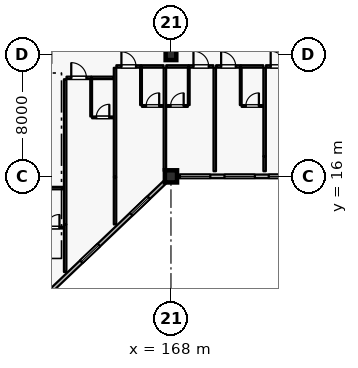
"""IFC4 building model, lengths in metres.
Left out: names, types, materials, properties, quantities, classifications, styles, units other than length and angle.
Written with IfcOpenShell. Run it as: python <this file> out.ifc"""

import sys

from ifc_helpers import new_model, si_unit, direction, frame, frame_2d, origin, origin_2d, place, context, subcontext, project, spatial, rectangle, extrude, element, fill, save


model = new_model("IFC4")
c1 = context("Model", 3, precision=1e-05, world=origin(), true_north=direction((0.0, 1.0)))
c2 = subcontext(c1, "Body", "Model", "MODEL_VIEW")
j1 = project(units=[si_unit("LENGTHUNIT", "METRE"), si_unit("PLANEANGLEUNIT", "RADIAN")], contexts=[c1])
p1 = place(None, origin())
s1 = spatial("IfcSite", under=j1, at=p1, CompositionType="ELEMENT")
p2 = place(p1, origin())
s2 = spatial("IfcBuilding", under=s1, at=p2, CompositionType="ELEMENT")
p3 = place(p2, frame((0.0, 0.0, 16.2)))
s3 = spatial("IfcBuildingStorey", under=s2, at=p3, CompositionType="ELEMENT", Elevation=16.2)
p4 = place(p3, frame((168.0, 16.0, 0.0), z_axis=(0.0, 0.0, 1.0), x_axis=(1.0, 0.0, 0.0)))
e1 = element("IfcColumn", 1, at=p4, inside=s3, PredefinedType="COLUMN", context=c2, shape_type="SweptSolid", body=[
    extrude(rectangle(XDim=0.8, YDim=0.8, at=origin_2d()), origin(), (0.0, 0.0, 1.0), 4.8),
])
p5 = place(p3, frame((168.0, 24.0, 0.0), z_axis=(0.0, 0.0, 1.0), x_axis=(1.0, 0.0, 0.0)))
e2 = element("IfcColumn", 2, at=p5, inside=s3, PredefinedType="COLUMN", context=c2, shape_type="SweptSolid", body=[
    extrude(rectangle(XDim=0.7, YDim=0.7, at=origin_2d()), origin(), (0.0, 0.0, 1.0), 4.8),
])
p6 = place(p3, frame((167.6, 15.619, 0.0), z_axis=(0.0, 0.0, 1.0), x_axis=(-0.724156739794, -0.689635422677, 0.0)))
e3 = element("IfcWall", 3, at=p6, inside=s3, PredefinedType="SOLIDWALL", context=c2, shape_type="SweptSolid", body=[
    extrude(rectangle(XDim=10.495, YDim=0.24, at=frame_2d((5.248, 0.0))), origin(), (0.0, 0.0, 1.0), 4.13),
])
p7 = place(p6, frame((1.465, 0.0, 0.8)))
e4 = element("IfcOpeningElement", 4, at=p7, cuts=e3, PredefinedType="OPENING", context=c2, shape_type="SweptSolid", body=[
    extrude(rectangle(XDim=1.6, YDim=1.6, at=frame_2d((0.8, 0.8))), frame((0.0, 0.13, 0.0), z_axis=(0.0, -1.0, 0.0), x_axis=(1.0, 0.0, 0.0)), (0.0, 0.0, 1.0), 0.26),
])
p8 = place(p6, frame((5.994, 0.0, 0.8)))
e5 = element("IfcOpeningElement", 5, at=p8, cuts=e3, PredefinedType="OPENING", context=c2, shape_type="SweptSolid", body=[
    extrude(rectangle(XDim=1.6, YDim=1.6, at=frame_2d((0.8, 0.8))), frame((0.0, 0.13, 0.0), z_axis=(0.0, -1.0, 0.0), x_axis=(1.0, 0.0, 0.0)), (0.0, 0.0, 1.0), 0.26),
])
p9 = place(p3, frame((176.0, 16.0, 0.0), z_axis=(0.0, 0.0, 1.0), x_axis=(-1.0, 0.0, 0.0)))
e6 = element("IfcWall", 6, at=p9, inside=s3, PredefinedType="SOLIDWALL", context=c2, shape_type="SweptSolid", body=[
    extrude(rectangle(XDim=7.6, YDim=0.24, at=frame_2d((3.8, 0.0))), origin(), (0.0, 0.0, 1.0), 4.13),
])
p10 = place(p9, frame((0.17, 0.0, 0.8)))
e7 = element("IfcOpeningElement", 7, at=p10, cuts=e6, PredefinedType="OPENING", context=c2, shape_type="SweptSolid", body=[
    extrude(rectangle(XDim=1.4, YDim=1.6, at=frame_2d((0.7, 0.8))), frame((0.0, 0.13, 0.0), z_axis=(0.0, -1.0, 0.0), x_axis=(1.0, 0.0, 0.0)), (0.0, 0.0, 1.0), 0.26),
])
p11 = place(p9, frame((2.48, 0.0, 0.8)))
e8 = element("IfcOpeningElement", 8, at=p11, cuts=e6, PredefinedType="OPENING", context=c2, shape_type="SweptSolid", body=[
    extrude(rectangle(XDim=2.0, YDim=1.75, at=frame_2d((1.0, 0.875))), frame((0.0, 0.13, 0.0), z_axis=(0.0, -1.0, 0.0), x_axis=(1.0, 0.0, 0.0)), (0.0, 0.0, 1.0), 0.26),
])
p12 = place(p9, frame((5.41, 0.0, 0.8)))
e9 = element("IfcOpeningElement", 9, at=p12, cuts=e6, PredefinedType="OPENING", context=c2, shape_type="SweptSolid", body=[
    extrude(rectangle(XDim=2.0, YDim=1.75, at=frame_2d((1.0, 0.875))), frame((0.0, 0.13, 0.0), z_axis=(0.0, -1.0, 0.0), x_axis=(1.0, 0.0, 0.0)), (0.0, 0.0, 1.0), 0.26),
])
p13 = place(p3, frame((159.48, 15.23, 0.0), z_axis=(0.0, 0.0, 1.0), x_axis=(1.0, 0.0, 0.0)))
e10 = element("IfcWall", 10, at=p13, inside=s3, PredefinedType="PARTITIONING", context=c2, shape_type="SweptSolid", body=[
    extrude(rectangle(XDim=1.47, YDim=0.16, at=frame_2d((0.735, 0.0))), origin(), (0.0, 0.0, 1.0), 4.535),
])
p14 = place(p3, frame((159.53, 12.63, 0.0), z_axis=(0.0, 0.0, 1.0), x_axis=(1.0, 0.0, 0.0)))
e11 = element("IfcWall", 11, at=p14, inside=s3, PredefinedType="PARTITIONING", context=c2, shape_type="SweptSolid", body=[
    extrude(rectangle(XDim=1.41, YDim=0.115, at=frame_2d((0.705, 0.0))), origin(), (0.0, 0.0, 1.0), 4.535),
])
p15 = place(p14, frame((0.275, 0.0, 0.0)))
e12 = element("IfcOpeningElement", 12, at=p15, cuts=e11, PredefinedType="OPENING", context=c2, shape_type="SweptSolid", body=[
    extrude(rectangle(XDim=0.86, YDim=2.12, at=frame_2d((0.43, 1.06))), frame((0.0, 0.067, 0.0), z_axis=(0.0, -1.0, 0.0), x_axis=(1.0, 0.0, 0.0)), (0.0, 0.0, 1.0), 0.135),
])
p16 = place(p3, frame((161.04, 9.71, 0.0), z_axis=(0.0, 0.0, 1.0), x_axis=(0.0, 1.0, 0.0)))
e13 = element("IfcWall", 13, at=p16, inside=s3, PredefinedType="PARTITIONING", context=c2, shape_type="SweptSolid", body=[
    extrude(rectangle(XDim=3.12, YDim=0.16, at=frame_2d((1.56, 0.0))), origin(), (0.0, 0.0, 1.0), 4.535),
])
p17 = place(p3, frame((161.13, 22.48, 0.0), z_axis=(0.0, 0.0, 1.0), x_axis=(1.0, 0.0, 0.0)))
e14 = element("IfcWall", 14, at=p17, inside=s3, PredefinedType="PARTITIONING", context=c2, shape_type="SweptSolid", body=[
    extrude(rectangle(XDim=1.62, YDim=0.16, at=frame_2d((0.81, 0.0))), origin(), (0.0, 0.0, 1.0), 4.535),
])
p18 = place(p17, frame((0.31, 0.0, 0.0)))
e15 = element("IfcOpeningElement", 15, at=p18, cuts=e14, PredefinedType="OPENING", context=c2, shape_type="SweptSolid", body=[
    extrude(rectangle(XDim=1.0, YDim=2.25, at=frame_2d((0.5, 1.125))), frame((0.0, 0.09, 0.0), z_axis=(0.0, -1.0, 0.0), x_axis=(1.0, 0.0, 0.0)), (0.0, 0.0, 1.0), 0.18),
])
p19 = place(p3, frame((162.76, 22.48, 0.0), z_axis=(0.0, 0.0, 1.0), x_axis=(1.0, 0.0, 0.0)))
e16 = element("IfcWall", 16, at=p19, inside=s3, PredefinedType="PARTITIONING", context=c2, shape_type="SweptSolid", body=[
    extrude(rectangle(XDim=1.47, YDim=0.16, at=frame_2d((0.735, 0.0))), origin(), (0.0, 0.0, 1.0), 4.535),
])
p20 = place(p3, frame((162.75, 19.94, 0.0), z_axis=(0.0, 0.0, 1.0), x_axis=(0.0, 1.0, 0.0)))
e17 = element("IfcWall", 17, at=p20, inside=s3, PredefinedType="PARTITIONING", context=c2, shape_type="SweptSolid", body=[
    extrude(rectangle(XDim=2.45, YDim=0.115, at=frame_2d((1.225, 0.0))), origin(), (0.0, 0.0, 1.0), 4.535),
])
p21 = place(p3, frame((162.81, 19.88, 0.0), z_axis=(0.0, 0.0, 1.0), x_axis=(1.0, 0.0, 0.0)))
e18 = element("IfcWall", 18, at=p21, inside=s3, PredefinedType="PARTITIONING", context=c2, shape_type="SweptSolid", body=[
    extrude(rectangle(XDim=1.41, YDim=0.115, at=frame_2d((0.705, 0.0))), origin(), (0.0, 0.0, 1.0), 4.535),
])
p22 = place(p21, frame((0.275, 0.0, 0.0)))
e19 = element("IfcOpeningElement", 19, at=p22, cuts=e18, PredefinedType="OPENING", context=c2, shape_type="SweptSolid", body=[
    extrude(rectangle(XDim=0.86, YDim=2.12, at=frame_2d((0.43, 1.06))), frame((0.0, 0.067, 0.0), z_axis=(0.0, -1.0, 0.0), x_axis=(1.0, 0.0, 0.0)), (0.0, 0.0, 1.0), 0.135),
])
p23 = place(p3, frame((161.04, 12.84, 0.0), z_axis=(0.0, 0.0, 1.0), x_axis=(0.0, 1.0, 0.0)))
e20 = element("IfcWall", 20, at=p23, inside=s3, PredefinedType="PARTITIONING", context=c2, shape_type="SweptSolid", body=[
    extrude(rectangle(XDim=9.55, YDim=0.16, at=frame_2d((4.775, 0.0))), origin(), (0.0, 0.0, 1.0), 4.535),
])
p24 = place(p3, frame((164.32, 12.84, 0.0), z_axis=(0.0, 0.0, 1.0), x_axis=(0.0, 1.0, 0.0)))
e21 = element("IfcWall", 21, at=p24, inside=s3, PredefinedType="PARTITIONING", context=c2, shape_type="SweptSolid", body=[
    extrude(rectangle(XDim=3.11, YDim=0.16, at=frame_2d((1.555, 0.0))), origin(), (0.0, 0.0, 1.0), 4.535),
])
p25 = place(p3, frame((164.41, 23.23, 0.0), z_axis=(0.0, 0.0, 1.0), x_axis=(1.0, 0.0, 0.0)))
e22 = element("IfcWall", 22, at=p25, inside=s3, PredefinedType="PARTITIONING", context=c2, shape_type="SweptSolid", body=[
    extrude(rectangle(XDim=1.62, YDim=0.16, at=frame_2d((0.81, 0.0))), origin(), (0.0, 0.0, 1.0), 4.535),
])
p26 = place(p25, frame((0.33, 0.0, 0.0)))
e23 = element("IfcOpeningElement", 23, at=p26, cuts=e22, PredefinedType="OPENING", context=c2, shape_type="SweptSolid", body=[
    extrude(rectangle(XDim=0.96, YDim=2.2, at=frame_2d((0.48, 1.1))), frame((0.0, 0.09, 0.0), z_axis=(0.0, -1.0, 0.0), x_axis=(1.0, 0.0, 0.0)), (0.0, 0.0, 1.0), 0.18),
])
p27 = place(p3, frame((166.04, 23.23, 0.0), z_axis=(0.0, 0.0, 1.0), x_axis=(1.0, 0.0, 0.0)))
e24 = element("IfcWall", 24, at=p27, inside=s3, PredefinedType="PARTITIONING", context=c2, shape_type="SweptSolid", body=[
    extrude(rectangle(XDim=1.47, YDim=0.16, at=frame_2d((0.735, 0.0))), origin(), (0.0, 0.0, 1.0), 4.535),
])
p28 = place(p3, frame((166.03, 20.69, 0.0), z_axis=(0.0, 0.0, 1.0), x_axis=(0.0, 1.0, 0.0)))
e25 = element("IfcWall", 25, at=p28, inside=s3, PredefinedType="PARTITIONING", context=c2, shape_type="SweptSolid", body=[
    extrude(rectangle(XDim=2.45, YDim=0.115, at=frame_2d((1.225, 0.0))), origin(), (0.0, 0.0, 1.0), 4.535),
])
p29 = place(p3, frame((166.09, 20.63, 0.0), z_axis=(0.0, 0.0, 1.0), x_axis=(1.0, 0.0, 0.0)))
e26 = element("IfcWall", 26, at=p29, inside=s3, PredefinedType="PARTITIONING", context=c2, shape_type="SweptSolid", body=[
    extrude(rectangle(XDim=1.41, YDim=0.115, at=frame_2d((0.705, 0.0))), origin(), (0.0, 0.0, 1.0), 4.535),
])
p30 = place(p29, frame((0.275, 0.0, 0.0)))
e27 = element("IfcOpeningElement", 27, at=p30, cuts=e26, PredefinedType="OPENING", context=c2, shape_type="SweptSolid", body=[
    extrude(rectangle(XDim=0.86, YDim=2.12, at=frame_2d((0.43, 1.06))), frame((0.0, 0.067, 0.0), z_axis=(0.0, -1.0, 0.0), x_axis=(1.0, 0.0, 0.0)), (0.0, 0.0, 1.0), 0.135),
])
p31 = place(p3, frame((164.32, 15.96, 0.0), z_axis=(0.0, 0.0, 1.0), x_axis=(0.0, 1.0, 0.0)))
e28 = element("IfcWall", 28, at=p31, inside=s3, PredefinedType="PARTITIONING", context=c2, shape_type="SweptSolid", body=[
    extrude(rectangle(XDim=7.18, YDim=0.16, at=frame_2d((3.59, 0.0))), origin(), (0.0, 0.0, 1.0), 4.535),
])
p32 = place(p3, frame((167.69, 23.23, 0.0), z_axis=(0.0, 0.0, 1.0), x_axis=(1.0, 0.0, 0.0)))
e29 = element("IfcWall", 29, at=p32, inside=s3, PredefinedType="PARTITIONING", context=c2, shape_type="SweptSolid", body=[
    extrude(rectangle(XDim=1.47, YDim=0.16, at=frame_2d((0.735, 0.0))), origin(), (0.0, 0.0, 1.0), 4.535),
])
p33 = place(p3, frame((169.17, 23.23, 0.0), z_axis=(0.0, 0.0, 1.0), x_axis=(1.0, 0.0, 0.0)))
e30 = element("IfcWall", 30, at=p33, inside=s3, PredefinedType="PARTITIONING", context=c2, shape_type="SweptSolid", body=[
    extrude(rectangle(XDim=1.62, YDim=0.16, at=frame_2d((0.81, 0.0))), origin(), (0.0, 0.0, 1.0), 4.535),
])
p34 = place(p33, frame((0.31, 0.0, 0.0)))
e31 = element("IfcOpeningElement", 31, at=p34, cuts=e30, PredefinedType="OPENING", context=c2, shape_type="SweptSolid", body=[
    extrude(rectangle(XDim=1.0, YDim=2.25, at=frame_2d((0.5, 1.125))), frame((0.0, 0.09, 0.0), z_axis=(0.0, -1.0, 0.0), x_axis=(1.0, 0.0, 0.0)), (0.0, 0.0, 1.0), 0.18),
])
p35 = place(p3, frame((169.17, 20.69, 0.0), z_axis=(0.0, 0.0, 1.0), x_axis=(0.0, 1.0, 0.0)))
e32 = element("IfcWall", 32, at=p35, inside=s3, PredefinedType="PARTITIONING", context=c2, shape_type="SweptSolid", body=[
    extrude(rectangle(XDim=2.45, YDim=0.115, at=frame_2d((1.225, 0.0))), origin(), (0.0, 0.0, 1.0), 4.535),
])
p36 = place(p3, frame((167.7, 20.63, 0.0), z_axis=(0.0, 0.0, 1.0), x_axis=(1.0, 0.0, 0.0)))
e33 = element("IfcWall", 33, at=p36, inside=s3, PredefinedType="PARTITIONING", context=c2, shape_type="SweptSolid", body=[
    extrude(rectangle(XDim=1.41, YDim=0.115, at=frame_2d((0.705, 0.0))), origin(), (0.0, 0.0, 1.0), 4.535),
])
p37 = place(p36, frame((0.275, 0.0, 0.0)))
e34 = element("IfcOpeningElement", 34, at=p37, cuts=e33, PredefinedType="OPENING", context=c2, shape_type="SweptSolid", body=[
    extrude(rectangle(XDim=0.86, YDim=2.12, at=frame_2d((0.43, 1.06))), frame((0.0, 0.067, 0.0), z_axis=(0.0, -1.0, 0.0), x_axis=(1.0, 0.0, 0.0)), (0.0, 0.0, 1.0), 0.135),
])
p38 = place(p3, frame((167.6, 16.34, 0.0), z_axis=(0.0, 0.0, 1.0), x_axis=(0.0, 1.0, 0.0)))
e35 = element("IfcWall", 35, at=p38, inside=s3, PredefinedType="PARTITIONING", context=c2, shape_type="SweptSolid", body=[
    extrude(rectangle(XDim=6.8, YDim=0.16, at=frame_2d((3.4, 0.0))), origin(), (0.0, 0.0, 1.0), 4.535),
])
p39 = place(p3, frame((170.97, 23.23, 0.0), z_axis=(0.0, 0.0, 1.0), x_axis=(1.0, 0.0, 0.0)))
e36 = element("IfcWall", 36, at=p39, inside=s3, PredefinedType="PARTITIONING", context=c2, shape_type="SweptSolid", body=[
    extrude(rectangle(XDim=1.62, YDim=0.16, at=frame_2d((0.81, 0.0))), origin(), (0.0, 0.0, 1.0), 4.535),
])
p40 = place(p39, frame((0.33, 0.0, 0.0)))
e37 = element("IfcOpeningElement", 37, at=p40, cuts=e36, PredefinedType="OPENING", context=c2, shape_type="SweptSolid", body=[
    extrude(rectangle(XDim=0.96, YDim=2.2, at=frame_2d((0.48, 1.1))), frame((0.0, 0.09, 0.0), z_axis=(0.0, -1.0, 0.0), x_axis=(1.0, 0.0, 0.0)), (0.0, 0.0, 1.0), 0.18),
])
p41 = place(p3, frame((172.6, 23.23, 0.0), z_axis=(0.0, 0.0, 1.0), x_axis=(1.0, 0.0, 0.0)))
e38 = element("IfcWall", 38, at=p41, inside=s3, PredefinedType="PARTITIONING", context=c2, shape_type="SweptSolid", body=[
    extrude(rectangle(XDim=1.47, YDim=0.16, at=frame_2d((0.735, 0.0))), origin(), (0.0, 0.0, 1.0), 4.535),
])
p42 = place(p3, frame((172.59, 20.69, 0.0), z_axis=(0.0, 0.0, 1.0), x_axis=(0.0, 1.0, 0.0)))
e39 = element("IfcWall", 39, at=p42, inside=s3, PredefinedType="PARTITIONING", context=c2, shape_type="SweptSolid", body=[
    extrude(rectangle(XDim=2.45, YDim=0.115, at=frame_2d((1.225, 0.0))), origin(), (0.0, 0.0, 1.0), 4.535),
])
p43 = place(p3, frame((172.65, 20.63, 0.0), z_axis=(0.0, 0.0, 1.0), x_axis=(1.0, 0.0, 0.0)))
e40 = element("IfcWall", 40, at=p43, inside=s3, PredefinedType="PARTITIONING", context=c2, shape_type="SweptSolid", body=[
    extrude(rectangle(XDim=1.41, YDim=0.115, at=frame_2d((0.705, 0.0))), origin(), (0.0, 0.0, 1.0), 4.535),
])
p44 = place(p43, frame((0.275, 0.0, 0.0)))
e41 = element("IfcOpeningElement", 41, at=p44, cuts=e40, PredefinedType="OPENING", context=c2, shape_type="SweptSolid", body=[
    extrude(rectangle(XDim=0.86, YDim=2.12, at=frame_2d((0.43, 1.06))), frame((0.0, 0.067, 0.0), z_axis=(0.0, -1.0, 0.0), x_axis=(1.0, 0.0, 0.0)), (0.0, 0.0, 1.0), 0.135),
])
p45 = place(p3, frame((170.88, 16.34, 0.0), z_axis=(0.0, 0.0, 1.0), x_axis=(0.0, 1.0, 0.0)))
e42 = element("IfcWall", 42, at=p45, inside=s3, PredefinedType="PARTITIONING", context=c2, shape_type="SweptSolid", body=[
    extrude(rectangle(XDim=6.8, YDim=0.16, at=frame_2d((3.4, 0.0))), origin(), (0.0, 0.0, 1.0), 4.535),
])
p46 = place(p3, frame((174.16, 16.34, 0.0), z_axis=(0.0, 0.0, 1.0), x_axis=(0.0, 1.0, 0.0)))
e43 = element("IfcWall", 43, at=p46, inside=s3, PredefinedType="PARTITIONING", context=c2, shape_type="SweptSolid", body=[
    extrude(rectangle(XDim=0.98, YDim=0.16, at=frame_2d((0.49, 0.0))), origin(), (0.0, 0.0, 1.0), 4.535),
])
p47 = place(p3, frame((174.25, 23.23, 0.0), z_axis=(0.0, 0.0, 1.0), x_axis=(1.0, 0.0, 0.0)))
e44 = element("IfcWall", 44, at=p47, inside=s3, PredefinedType="PARTITIONING", context=c2, shape_type="SweptSolid", body=[
    extrude(rectangle(XDim=1.62, YDim=0.16, at=frame_2d((0.81, 0.0))), origin(), (0.0, 0.0, 1.0), 4.535),
])
p48 = place(p47, frame((0.31, 0.0, 0.0)))
e45 = element("IfcOpeningElement", 45, at=p48, cuts=e44, PredefinedType="OPENING", context=c2, shape_type="SweptSolid", body=[
    extrude(rectangle(XDim=1.0, YDim=2.25, at=frame_2d((0.5, 1.125))), frame((0.0, 0.09, 0.0), z_axis=(0.0, -1.0, 0.0), x_axis=(1.0, 0.0, 0.0)), (0.0, 0.0, 1.0), 0.18),
])
p49 = place(p3, frame((174.16, 17.33, 0.0), z_axis=(0.0, 0.0, 1.0), x_axis=(0.0, 1.0, 0.0)))
e46 = element("IfcWall", 46, at=p49, inside=s3, PredefinedType="PARTITIONING", context=c2, shape_type="SweptSolid", body=[
    extrude(rectangle(XDim=5.81, YDim=0.16, at=frame_2d((2.905, 0.0))), origin(), (0.0, 0.0, 1.0), 4.535),
])
p50 = place(p7, origin())
e47 = element("IfcWindow", 47, at=p50, inside=s3, PartitioningType="SINGLE_PANEL", PredefinedType="WINDOW", context=c2, shape_type="SweptSolid", body=[
    extrude(rectangle(XDim=1.6, YDim=1.6, at=frame_2d((0.8, 0.8))), frame((0.0, 0.03, 0.0), z_axis=(0.0, -1.0, 0.0), x_axis=(1.0, 0.0, 0.0)), (0.0, 0.0, 1.0), 0.06),
])
fill(e4, e47)
p51 = place(p8, origin())
e48 = element("IfcWindow", 48, at=p51, inside=s3, PartitioningType="SINGLE_PANEL", PredefinedType="WINDOW", context=c2, shape_type="SweptSolid", body=[
    extrude(rectangle(XDim=1.6, YDim=1.6, at=frame_2d((0.8, 0.8))), frame((0.0, 0.03, 0.0), z_axis=(0.0, -1.0, 0.0), x_axis=(1.0, 0.0, 0.0)), (0.0, 0.0, 1.0), 0.06),
])
fill(e5, e48)
p52 = place(p10, origin())
e49 = element("IfcWindow", 49, at=p52, inside=s3, PartitioningType="SINGLE_PANEL", PredefinedType="WINDOW", context=c2, shape_type="SweptSolid", body=[
    extrude(rectangle(XDim=1.4, YDim=1.6, at=frame_2d((0.7, 0.8))), frame((0.0, 0.03, 0.0), z_axis=(0.0, -1.0, 0.0), x_axis=(1.0, 0.0, 0.0)), (0.0, 0.0, 1.0), 0.06),
])
fill(e7, e49)
p53 = place(p11, origin())
e50 = element("IfcWindow", 50, at=p53, inside=s3, PartitioningType="DOUBLE_PANEL_VERTICAL", PredefinedType="WINDOW", context=c2, shape_type="SweptSolid", body=[
    extrude(rectangle(XDim=2.0, YDim=1.75, at=frame_2d((1.0, 0.875))), frame((0.0, 0.03, 0.0), z_axis=(0.0, -1.0, 0.0), x_axis=(1.0, 0.0, 0.0)), (0.0, 0.0, 1.0), 0.06),
])
fill(e8, e50)
p54 = place(p12, origin())
e51 = element("IfcWindow", 51, at=p54, inside=s3, PartitioningType="DOUBLE_PANEL_VERTICAL", PredefinedType="WINDOW", context=c2, shape_type="SweptSolid", body=[
    extrude(rectangle(XDim=2.0, YDim=1.75, at=frame_2d((1.0, 0.875))), frame((0.0, 0.03, 0.0), z_axis=(0.0, -1.0, 0.0), x_axis=(1.0, 0.0, 0.0)), (0.0, 0.0, 1.0), 0.06),
])
fill(e9, e51)
p55 = place(p15, origin())
e52 = element("IfcDoor", 52, at=p55, inside=s3, OperationType="SINGLE_SWING_RIGHT", PredefinedType="DOOR", context=c2, shape_type="SweptSolid", body=[
    extrude(rectangle(XDim=0.86, YDim=2.12, at=frame_2d((0.43, 1.06))), frame((0.0, 0.025, 0.0), z_axis=(0.0, -1.0, 0.0), x_axis=(1.0, 0.0, 0.0)), (0.0, 0.0, 1.0), 0.05),
])
fill(e12, e52)
p56 = place(p18, origin())
e53 = element("IfcDoor", 53, at=p56, inside=s3, OperationType="SINGLE_SWING_LEFT", PredefinedType="DOOR", context=c2, shape_type="SweptSolid", body=[
    extrude(rectangle(XDim=1.0, YDim=2.25, at=frame_2d((0.5, 1.125))), frame((0.0, 0.025, 0.0), z_axis=(0.0, -1.0, 0.0), x_axis=(1.0, 0.0, 0.0)), (0.0, 0.0, 1.0), 0.05),
])
fill(e15, e53)
p57 = place(p22, origin())
e54 = element("IfcDoor", 54, at=p57, inside=s3, OperationType="SINGLE_SWING_RIGHT", PredefinedType="DOOR", context=c2, shape_type="SweptSolid", body=[
    extrude(rectangle(XDim=0.86, YDim=2.12, at=frame_2d((0.43, 1.06))), frame((0.0, 0.025, 0.0), z_axis=(0.0, -1.0, 0.0), x_axis=(1.0, 0.0, 0.0)), (0.0, 0.0, 1.0), 0.05),
])
fill(e19, e54)
p58 = place(p26, origin())
e55 = element("IfcDoor", 55, at=p58, inside=s3, OperationType="SINGLE_SWING_LEFT", PredefinedType="DOOR", context=c2, shape_type="SweptSolid", body=[
    extrude(rectangle(XDim=0.96, YDim=2.2, at=frame_2d((0.48, 1.1))), frame((0.0, 0.025, 0.0), z_axis=(0.0, -1.0, 0.0), x_axis=(1.0, 0.0, 0.0)), (0.0, 0.0, 1.0), 0.05),
])
fill(e23, e55)
p59 = place(p30, origin())
e56 = element("IfcDoor", 56, at=p59, inside=s3, OperationType="SINGLE_SWING_RIGHT", PredefinedType="DOOR", context=c2, shape_type="SweptSolid", body=[
    extrude(rectangle(XDim=0.86, YDim=2.12, at=frame_2d((0.43, 1.06))), frame((0.0, 0.025, 0.0), z_axis=(0.0, -1.0, 0.0), x_axis=(1.0, 0.0, 0.0)), (0.0, 0.0, 1.0), 0.05),
])
fill(e27, e56)
p60 = place(p34, origin())
e57 = element("IfcDoor", 57, at=p60, inside=s3, OperationType="SINGLE_SWING_LEFT", PredefinedType="DOOR", context=c2, shape_type="SweptSolid", body=[
    extrude(rectangle(XDim=1.0, YDim=2.25, at=frame_2d((0.5, 1.125))), frame((0.0, 0.025, 0.0), z_axis=(0.0, -1.0, 0.0), x_axis=(1.0, 0.0, 0.0)), (0.0, 0.0, 1.0), 0.05),
])
fill(e31, e57)
p61 = place(p37, origin())
e58 = element("IfcDoor", 58, at=p61, inside=s3, OperationType="SINGLE_SWING_RIGHT", PredefinedType="DOOR", context=c2, shape_type="SweptSolid", body=[
    extrude(rectangle(XDim=0.86, YDim=2.12, at=frame_2d((0.43, 1.06))), frame((0.0, 0.025, 0.0), z_axis=(0.0, -1.0, 0.0), x_axis=(1.0, 0.0, 0.0)), (0.0, 0.0, 1.0), 0.05),
])
fill(e34, e58)
p62 = place(p40, origin())
e59 = element("IfcDoor", 59, at=p62, inside=s3, OperationType="SINGLE_SWING_LEFT", PredefinedType="DOOR", context=c2, shape_type="SweptSolid", body=[
    extrude(rectangle(XDim=0.96, YDim=2.2, at=frame_2d((0.48, 1.1))), frame((0.0, 0.025, 0.0), z_axis=(0.0, -1.0, 0.0), x_axis=(1.0, 0.0, 0.0)), (0.0, 0.0, 1.0), 0.05),
])
fill(e37, e59)
p63 = place(p44, origin())
e60 = element("IfcDoor", 60, at=p63, inside=s3, OperationType="SINGLE_SWING_RIGHT", PredefinedType="DOOR", context=c2, shape_type="SweptSolid", body=[
    extrude(rectangle(XDim=0.86, YDim=2.12, at=frame_2d((0.43, 1.06))), frame((0.0, 0.025, 0.0), z_axis=(0.0, -1.0, 0.0), x_axis=(1.0, 0.0, 0.0)), (0.0, 0.0, 1.0), 0.05),
])
fill(e41, e60)
p64 = place(p48, origin())
e61 = element("IfcDoor", 61, at=p64, inside=s3, OperationType="SINGLE_SWING_LEFT", PredefinedType="DOOR", context=c2, shape_type="SweptSolid", body=[
    extrude(rectangle(XDim=1.0, YDim=2.25, at=frame_2d((0.5, 1.125))), frame((0.0, 0.025, 0.0), z_axis=(0.0, -1.0, 0.0), x_axis=(1.0, 0.0, 0.0)), (0.0, 0.0, 1.0), 0.05),
])
fill(e45, e61)
save(model, sys.argv[1])
